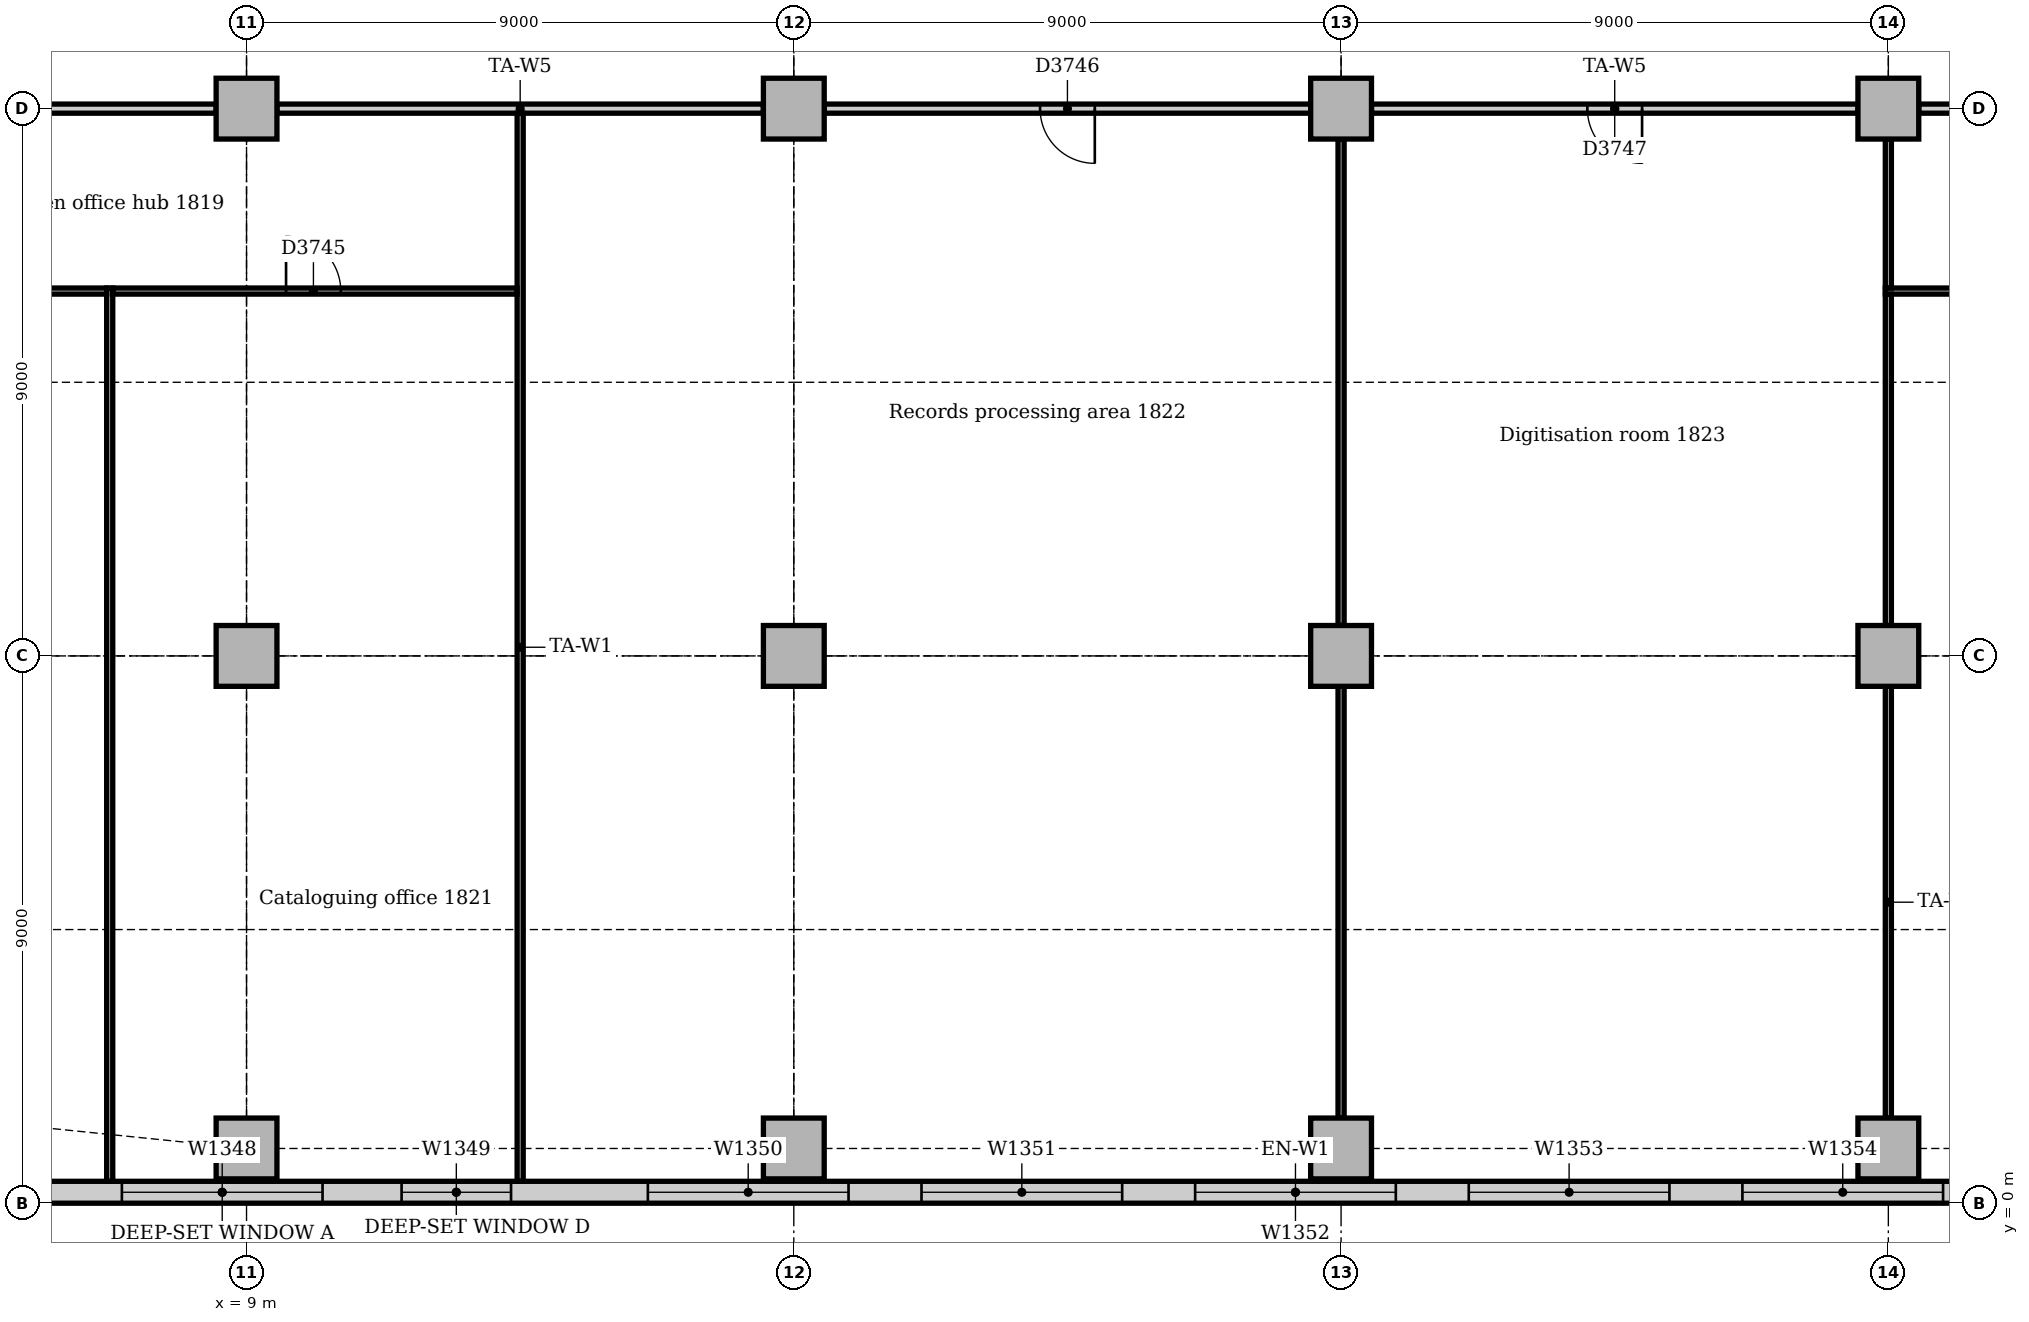
"""IFC4 building model, lengths in metres.
Left out: names, types, materials, properties, quantities, classifications, styles, units other than length and angle.
Written with IfcOpenShell. Run it as: python <this file> out.ifc"""

import sys

from ifc_helpers import new_model, si_unit, direction, frame, frame_2d, origin, origin_2d, place, context, subcontext, project, spatial, rectangle, extrude, element, fill, save


model = new_model("IFC4")
c1 = context("Model", 3, precision=1e-05, world=origin(), true_north=direction((0.0, 1.0)))
c2 = subcontext(c1, "Body", "Model", "MODEL_VIEW")
j1 = project(units=[si_unit("LENGTHUNIT", "METRE"), si_unit("PLANEANGLEUNIT", "RADIAN")], contexts=[c1])
p1 = place(None, origin())
s1 = spatial("IfcSite", under=j1, at=p1, CompositionType="ELEMENT")
p2 = place(p1, origin())
s2 = spatial("IfcBuilding", under=s1, at=p2, CompositionType="ELEMENT")
p3 = place(p2, frame((0.0, 0.0, 79.0)))
s3 = spatial("IfcBuildingStorey", under=s2, at=p3, CompositionType="ELEMENT", Elevation=79.0)
for number, where, z_axis, x_axis in (
    (1, (9.0, 0.9, 0.0), (0.0, 0.0, 1.0), (1.0, 0.0, 0.0)),
    (2, (18.0, 0.9, 0.0), (0.0, 0.0, 1.0), (1.0, 0.0, 0.0)),
    (3, (27.0, 0.9, 0.0), (0.0, 0.0, 1.0), (1.0, 0.0, 0.0)),
    (4, (36.0, 0.9, 0.0), (0.0, 0.0, 1.0), (1.0, 0.0, 0.0)),
    (5, (9.0, 9.0, 0.0), (0.0, 0.0, 1.0), (1.0, 0.0, 0.0)),
    (6, (9.0, 18.0, 0.0), (0.0, 0.0, 1.0), (1.0, 0.0, 0.0)),
    (7, (18.0, 9.0, 0.0), (0.0, 0.0, 1.0), (1.0, 0.0, 0.0)),
    (8, (18.0, 18.0, 0.0), (0.0, 0.0, 1.0), (1.0, 0.0, 0.0)),
    (9, (27.0, 9.0, 0.0), (0.0, 0.0, 1.0), (1.0, 0.0, 0.0)),
    (10, (27.0, 18.0, 0.0), (0.0, 0.0, 1.0), (1.0, 0.0, 0.0)),
    (11, (36.0, 9.0, 0.0), (0.0, 0.0, 1.0), (1.0, 0.0, 0.0)),
    (12, (36.0, 18.0, 0.0), (0.0, 0.0, 1.0), (1.0, 0.0, 0.0)),
):
    element("IfcColumn", number, at=place(p3, frame(where, z_axis=z_axis, x_axis=x_axis)), inside=s3, PredefinedType="COLUMN", context=c2, shape_type="SweptSolid", body=[
        extrude(rectangle(XDim=1.0, YDim=1.0, at=origin_2d()), origin(), (0.0, 0.0, 1.0), 3.85),
    ])
p4 = place(p3, frame((4.243, 0.18, 0.0), z_axis=(0.0, 0.0, 1.0), x_axis=(1.0, 0.0, 0.0)))
e13 = element("IfcWall", 13, at=p4, inside=s3, PredefinedType="STANDARD", context=c2, shape_type="SweptSolid", body=[
    extrude(rectangle(XDim=44.015, YDim=0.36, at=frame_2d((22.007, 0.0))), origin(), (0.0, 0.0, 1.0), 3.85),
])
p5 = place(p4, frame((2.707, 0.0, 0.9)))
e14 = element("IfcOpeningElement", 14, at=p5, cuts=e13, PredefinedType="OPENING", context=c2, shape_type="SweptSolid", body=[
    extrude(rectangle(XDim=3.3, YDim=1.6, at=frame_2d((1.65, 0.8))), frame((0.0, 0.19, 0.0), z_axis=(0.0, -1.0, 0.0), x_axis=(1.0, 0.0, 0.0)), (0.0, 0.0, 1.0), 0.38),
])
p6 = place(p4, frame((7.307, 0.0, 0.9)))
e15 = element("IfcOpeningElement", 15, at=p6, cuts=e13, PredefinedType="OPENING", context=c2, shape_type="SweptSolid", body=[
    extrude(rectangle(XDim=1.8, YDim=1.6, at=frame_2d((0.9, 0.8))), frame((0.0, 0.19, 0.0), z_axis=(0.0, -1.0, 0.0), x_axis=(1.0, 0.0, 0.0)), (0.0, 0.0, 1.0), 0.38),
])
p7 = place(p4, frame((11.357, 0.0, 0.9)))
e16 = element("IfcOpeningElement", 16, at=p7, cuts=e13, PredefinedType="OPENING", context=c2, shape_type="SweptSolid", body=[
    extrude(rectangle(XDim=3.3, YDim=1.6, at=frame_2d((1.65, 0.8))), frame((0.0, 0.19, 0.0), z_axis=(0.0, -1.0, 0.0), x_axis=(1.0, 0.0, 0.0)), (0.0, 0.0, 1.0), 0.38),
])
p8 = place(p4, frame((15.857, 0.0, 0.9)))
e17 = element("IfcOpeningElement", 17, at=p8, cuts=e13, PredefinedType="OPENING", context=c2, shape_type="SweptSolid", body=[
    extrude(rectangle(XDim=3.3, YDim=1.6, at=frame_2d((1.65, 0.8))), frame((0.0, 0.19, 0.0), z_axis=(0.0, -1.0, 0.0), x_axis=(1.0, 0.0, 0.0)), (0.0, 0.0, 1.0), 0.38),
])
p9 = place(p4, frame((20.357, 0.0, 0.9)))
e18 = element("IfcOpeningElement", 18, at=p9, cuts=e13, PredefinedType="OPENING", context=c2, shape_type="SweptSolid", body=[
    extrude(rectangle(XDim=3.3, YDim=1.6, at=frame_2d((1.65, 0.8))), frame((0.0, 0.19, 0.0), z_axis=(0.0, -1.0, 0.0), x_axis=(1.0, 0.0, 0.0)), (0.0, 0.0, 1.0), 0.38),
])
p10 = place(p4, frame((24.857, 0.0, 0.9)))
e19 = element("IfcOpeningElement", 19, at=p10, cuts=e13, PredefinedType="OPENING", context=c2, shape_type="SweptSolid", body=[
    extrude(rectangle(XDim=3.3, YDim=1.6, at=frame_2d((1.65, 0.8))), frame((0.0, 0.19, 0.0), z_axis=(0.0, -1.0, 0.0), x_axis=(1.0, 0.0, 0.0)), (0.0, 0.0, 1.0), 0.38),
])
p11 = place(p4, frame((29.357, 0.0, 0.9)))
e20 = element("IfcOpeningElement", 20, at=p11, cuts=e13, PredefinedType="OPENING", context=c2, shape_type="SweptSolid", body=[
    extrude(rectangle(XDim=3.3, YDim=1.6, at=frame_2d((1.65, 0.8))), frame((0.0, 0.19, 0.0), z_axis=(0.0, -1.0, 0.0), x_axis=(1.0, 0.0, 0.0)), (0.0, 0.0, 1.0), 0.38),
])
p12 = place(p4, frame((33.857, 0.0, 0.9)))
e21 = element("IfcOpeningElement", 21, at=p12, cuts=e13, PredefinedType="OPENING", context=c2, shape_type="SweptSolid", body=[
    extrude(rectangle(XDim=3.3, YDim=1.6, at=frame_2d((1.65, 0.8))), frame((0.0, 0.19, 0.0), z_axis=(0.0, -1.0, 0.0), x_axis=(1.0, 0.0, 0.0)), (0.0, 0.0, 1.0), 0.38),
])
p13 = place(p4, frame((38.357, 0.0, 0.9)))
e22 = element("IfcOpeningElement", 22, at=p13, cuts=e13, PredefinedType="OPENING", context=c2, shape_type="SweptSolid", body=[
    extrude(rectangle(XDim=3.3, YDim=1.6, at=frame_2d((1.65, 0.8))), frame((0.0, 0.19, 0.0), z_axis=(0.0, -1.0, 0.0), x_axis=(1.0, 0.0, 0.0)), (0.0, 0.0, 1.0), 0.38),
])
p14 = place(p3, frame((36.5, 18.0, 0.0), z_axis=(0.0, 0.0, 1.0), x_axis=(1.0, 0.0, 0.0)))
e23 = element("IfcWall", 23, at=p14, inside=s3, PredefinedType="PARTITIONING", context=c2, shape_type="SweptSolid", body=[
    extrude(rectangle(XDim=8.0, YDim=0.15, at=frame_2d((4.0, 0.0))), origin(), (0.0, 0.0, 1.0), 3.15),
])
p15 = place(p3, frame((27.5, 18.0, 0.0), z_axis=(0.0, 0.0, 1.0), x_axis=(1.0, 0.0, 0.0)))
e24 = element("IfcWall", 24, at=p15, inside=s3, PredefinedType="PARTITIONING", context=c2, shape_type="SweptSolid", body=[
    extrude(rectangle(XDim=8.0, YDim=0.15, at=frame_2d((4.0, 0.0))), origin(), (0.0, 0.0, 1.0), 3.15),
])
p16 = place(p15, frame((3.55, 0.0, 0.0)))
e25 = element("IfcOpeningElement", 25, at=p16, cuts=e24, PredefinedType="OPENING", context=c2, shape_type="SweptSolid", body=[
    extrude(rectangle(XDim=0.9, YDim=2.1, at=frame_2d((0.45, 1.05))), frame((0.0, 0.085, 0.0), z_axis=(0.0, -1.0, 0.0), x_axis=(1.0, 0.0, 0.0)), (0.0, 0.0, 1.0), 0.17),
])
p17 = place(p3, frame((18.5, 18.0, 0.0), z_axis=(0.0, 0.0, 1.0), x_axis=(1.0, 0.0, 0.0)))
e26 = element("IfcWall", 26, at=p17, inside=s3, PredefinedType="PARTITIONING", context=c2, shape_type="SweptSolid", body=[
    extrude(rectangle(XDim=8.0, YDim=0.15, at=frame_2d((4.0, 0.0))), origin(), (0.0, 0.0, 1.0), 3.15),
])
p18 = place(p17, frame((3.55, 0.0, 0.0)))
e27 = element("IfcOpeningElement", 27, at=p18, cuts=e26, PredefinedType="OPENING", context=c2, shape_type="SweptSolid", body=[
    extrude(rectangle(XDim=0.9, YDim=2.1, at=frame_2d((0.45, 1.05))), frame((0.0, 0.085, 0.0), z_axis=(0.0, -1.0, 0.0), x_axis=(1.0, 0.0, 0.0)), (0.0, 0.0, 1.0), 0.17),
])
p19 = place(p3, frame((9.5, 18.0, 0.0), z_axis=(0.0, 0.0, 1.0), x_axis=(1.0, 0.0, 0.0)))
e28 = element("IfcWall", 28, at=p19, inside=s3, PredefinedType="PARTITIONING", context=c2, shape_type="SweptSolid", body=[
    extrude(rectangle(XDim=8.0, YDim=0.15, at=frame_2d((4.0, 0.0))), origin(), (0.0, 0.0, 1.0), 3.15),
])
p20 = place(p3, frame((1.4, 18.0, 0.0), z_axis=(0.0, 0.0, 1.0), x_axis=(1.0, 0.0, 0.0)))
e29 = element("IfcWall", 29, at=p20, inside=s3, PredefinedType="PARTITIONING", context=c2, shape_type="SweptSolid", body=[
    extrude(rectangle(XDim=7.1, YDim=0.15, at=frame_2d((3.55, 0.0))), origin(), (0.0, 0.0, 1.0), 3.15),
])
p21 = place(p20, frame((3.05, 0.0, 0.0)))
e30 = element("IfcOpeningElement", 30, at=p21, cuts=e29, PredefinedType="OPENING", context=c2, shape_type="SweptSolid", body=[
    extrude(rectangle(XDim=1.0, YDim=2.1, at=frame_2d((0.5, 1.05))), frame((0.0, 0.085, 0.0), z_axis=(0.0, -1.0, 0.0), x_axis=(1.0, 0.0, 0.0)), (0.0, 0.0, 1.0), 0.17),
])
p22 = place(p3, frame((35.95, 15.0, 0.0), z_axis=(0.0, 0.0, 1.0), x_axis=(1.0, 0.0, 0.0)))
e31 = element("IfcWall", 31, at=p22, inside=s3, PredefinedType="PARTITIONING", context=c2, shape_type="SweptSolid", body=[
    extrude(rectangle(XDim=17.975, YDim=0.1, at=frame_2d((8.988, 0.0))), origin(), (0.0, 0.0, 1.0), 3.85),
])
p23 = place(p22, frame((8.55, 0.0, 0.0)))
e32 = element("IfcOpeningElement", 32, at=p23, cuts=e31, PredefinedType="OPENING", context=c2, shape_type="SweptSolid", body=[
    extrude(rectangle(XDim=0.9, YDim=2.1, at=frame_2d((0.45, 1.05))), frame((0.0, 0.06, 0.0), z_axis=(0.0, -1.0, 0.0), x_axis=(1.0, 0.0, 0.0)), (0.0, 0.0, 1.0), 0.12),
])
p24 = place(p3, frame((13.5, 0.36, 0.0), z_axis=(0.0, 0.0, 1.0), x_axis=(0.0, 1.0, 0.0)))
e33 = element("IfcWall", 33, at=p24, inside=s3, PredefinedType="PARTITIONING", context=c2, shape_type="SweptSolid", body=[
    extrude(rectangle(XDim=17.565, YDim=0.1, at=frame_2d((8.783, 0.0))), origin(), (0.0, 0.0, 1.0), 3.85),
])
p25 = place(p3, frame((27.0, 1.4, 0.0), z_axis=(0.0, 0.0, 1.0), x_axis=(0.0, 1.0, 0.0)))
e34 = element("IfcWall", 34, at=p25, inside=s3, PredefinedType="PARTITIONING", context=c2, shape_type="SweptSolid", body=[
    extrude(rectangle(XDim=7.1, YDim=0.1, at=frame_2d((3.55, 0.0))), origin(), (0.0, 0.0, 1.0), 3.158),
])
p26 = place(p3, frame((27.0, 9.5, 0.0), z_axis=(0.0, 0.0, 1.0), x_axis=(0.0, 1.0, 0.0)))
e35 = element("IfcWall", 35, at=p26, inside=s3, PredefinedType="PARTITIONING", context=c2, shape_type="SweptSolid", body=[
    extrude(rectangle(XDim=8.0, YDim=0.1, at=frame_2d((4.0, 0.0))), origin(), (0.0, 0.0, 1.0), 3.158),
])
p27 = place(p3, frame((36.0, 1.4, 0.0), z_axis=(0.0, 0.0, 1.0), x_axis=(0.0, 1.0, 0.0)))
e36 = element("IfcWall", 36, at=p27, inside=s3, PredefinedType="PARTITIONING", context=c2, shape_type="SweptSolid", body=[
    extrude(rectangle(XDim=7.1, YDim=0.1, at=frame_2d((3.55, 0.0))), origin(), (0.0, 0.0, 1.0), 3.158),
])
p28 = place(p3, frame((36.0, 15.05, 0.0), z_axis=(0.0, 0.0, 1.0), x_axis=(0.0, 1.0, 0.0)))
e37 = element("IfcWall", 37, at=p28, inside=s3, PredefinedType="PARTITIONING", context=c2, shape_type="SweptSolid", body=[
    extrude(rectangle(XDim=2.45, YDim=0.1, at=frame_2d((1.225, 0.0))), origin(), (0.0, 0.0, 1.0), 3.158),
])
p29 = place(p3, frame((36.0, 9.5, 0.0), z_axis=(0.0, 0.0, 1.0), x_axis=(0.0, 1.0, 0.0)))
e38 = element("IfcWall", 38, at=p29, inside=s3, PredefinedType="PARTITIONING", context=c2, shape_type="SweptSolid", body=[
    extrude(rectangle(XDim=5.45, YDim=0.1, at=frame_2d((2.725, 0.0))), origin(), (0.0, 0.0, 1.0), 3.158),
])
p30 = place(p3, frame((6.75, 0.36, 0.0), z_axis=(0.0, 0.0, 1.0), x_axis=(0.0, 1.0, 0.0)))
e39 = element("IfcWall", 39, at=p30, inside=s3, PredefinedType="PARTITIONING", context=c2, shape_type="SweptSolid", body=[
    extrude(rectangle(XDim=14.69, YDim=0.1, at=frame_2d((7.345, 0.0))), origin(), (0.0, 0.0, 1.0), 3.85),
])
p31 = place(p3, frame((6.8, 15.0, 0.0), z_axis=(0.0, 0.0, 1.0), x_axis=(1.0, 0.0, 0.0)))
e40 = element("IfcWall", 40, at=p31, inside=s3, PredefinedType="PARTITIONING", context=c2, shape_type="SweptSolid", body=[
    extrude(rectangle(XDim=6.65, YDim=0.1, at=frame_2d((3.325, 0.0))), origin(), (0.0, 0.0, 1.0), 3.85),
])
p32 = place(p31, frame((2.85, 0.0, 0.0)))
e41 = element("IfcOpeningElement", 41, at=p32, cuts=e40, PredefinedType="OPENING", context=c2, shape_type="SweptSolid", body=[
    extrude(rectangle(XDim=0.9, YDim=2.1, at=frame_2d((0.45, 1.05))), frame((0.0, 0.06, 0.0), z_axis=(0.0, -1.0, 0.0), x_axis=(1.0, 0.0, 0.0)), (0.0, 0.0, 1.0), 0.12),
])
p33 = place(p3, frame((0.36, 15.0, 0.0), z_axis=(0.0, 0.0, 1.0), x_axis=(1.0, 0.0, 0.0)))
e42 = element("IfcWall", 42, at=p33, inside=s3, PredefinedType="PARTITIONING", context=c2, shape_type="SweptSolid", body=[
    extrude(rectangle(XDim=6.34, YDim=0.1, at=frame_2d((3.17, 0.0))), origin(), (0.0, 0.0, 1.0), 3.85),
])
p34 = place(p33, frame((2.7, 0.0, 0.0)))
e43 = element("IfcOpeningElement", 43, at=p34, cuts=e42, PredefinedType="OPENING", context=c2, shape_type="SweptSolid", body=[
    extrude(rectangle(XDim=0.9, YDim=2.1, at=frame_2d((0.45, 1.05))), frame((0.0, 0.06, 0.0), z_axis=(0.0, -1.0, 0.0), x_axis=(1.0, 0.0, 0.0)), (0.0, 0.0, 1.0), 0.12),
])
p35 = place(p5, origin())
e44 = element("IfcWindow", 44, at=p35, inside=s3, PartitioningType="SINGLE_PANEL", PredefinedType="WINDOW", context=c2, shape_type="SweptSolid", body=[
    extrude(rectangle(XDim=3.3, YDim=1.6, at=frame_2d((1.65, 0.8))), frame((0.0, 0.13, 0.0), z_axis=(0.0, -1.0, 0.0), x_axis=(1.0, 0.0, 0.0)), (0.0, 0.0, 1.0), 0.06),
])
fill(e14, e44)
p36 = place(p6, origin())
e45 = element("IfcWindow", 45, at=p36, inside=s3, PartitioningType="SINGLE_PANEL", PredefinedType="WINDOW", context=c2, shape_type="SweptSolid", body=[
    extrude(rectangle(XDim=1.8, YDim=1.6, at=frame_2d((0.9, 0.8))), frame((0.0, 0.13, 0.0), z_axis=(0.0, -1.0, 0.0), x_axis=(1.0, 0.0, 0.0)), (0.0, 0.0, 1.0), 0.06),
])
fill(e15, e45)
p37 = place(p7, origin())
e46 = element("IfcWindow", 46, at=p37, inside=s3, PartitioningType="SINGLE_PANEL", PredefinedType="WINDOW", context=c2, shape_type="SweptSolid", body=[
    extrude(rectangle(XDim=3.3, YDim=1.6, at=frame_2d((1.65, 0.8))), frame((0.0, 0.13, 0.0), z_axis=(0.0, -1.0, 0.0), x_axis=(1.0, 0.0, 0.0)), (0.0, 0.0, 1.0), 0.06),
])
fill(e16, e46)
p38 = place(p8, origin())
e47 = element("IfcWindow", 47, at=p38, inside=s3, PartitioningType="SINGLE_PANEL", PredefinedType="WINDOW", context=c2, shape_type="SweptSolid", body=[
    extrude(rectangle(XDim=3.3, YDim=1.6, at=frame_2d((1.65, 0.8))), frame((0.0, 0.13, 0.0), z_axis=(0.0, -1.0, 0.0), x_axis=(1.0, 0.0, 0.0)), (0.0, 0.0, 1.0), 0.06),
])
fill(e17, e47)
p39 = place(p9, origin())
e48 = element("IfcWindow", 48, at=p39, inside=s3, PartitioningType="SINGLE_PANEL", PredefinedType="WINDOW", context=c2, shape_type="SweptSolid", body=[
    extrude(rectangle(XDim=3.3, YDim=1.6, at=frame_2d((1.65, 0.8))), frame((0.0, 0.13, 0.0), z_axis=(0.0, -1.0, 0.0), x_axis=(1.0, 0.0, 0.0)), (0.0, 0.0, 1.0), 0.06),
])
fill(e18, e48)
p40 = place(p10, origin())
e49 = element("IfcWindow", 49, at=p40, inside=s3, PartitioningType="SINGLE_PANEL", PredefinedType="WINDOW", context=c2, shape_type="SweptSolid", body=[
    extrude(rectangle(XDim=3.3, YDim=1.6, at=frame_2d((1.65, 0.8))), frame((0.0, 0.13, 0.0), z_axis=(0.0, -1.0, 0.0), x_axis=(1.0, 0.0, 0.0)), (0.0, 0.0, 1.0), 0.06),
])
fill(e19, e49)
p41 = place(p11, origin())
e50 = element("IfcWindow", 50, at=p41, inside=s3, PartitioningType="SINGLE_PANEL", PredefinedType="WINDOW", context=c2, shape_type="SweptSolid", body=[
    extrude(rectangle(XDim=3.3, YDim=1.6, at=frame_2d((1.65, 0.8))), frame((0.0, 0.13, 0.0), z_axis=(0.0, -1.0, 0.0), x_axis=(1.0, 0.0, 0.0)), (0.0, 0.0, 1.0), 0.06),
])
fill(e20, e50)
p42 = place(p32, origin())
e51 = element("IfcDoor", 51, at=p42, inside=s3, OperationType="SINGLE_SWING_LEFT", PredefinedType="DOOR", context=c2, shape_type="SweptSolid", body=[
    extrude(rectangle(XDim=0.9, YDim=2.1, at=frame_2d((0.45, 1.05))), frame((0.0, 0.025, 0.0), z_axis=(0.0, -1.0, 0.0), x_axis=(1.0, 0.0, 0.0)), (0.0, 0.0, 1.0), 0.05),
])
fill(e41, e51)
p43 = place(p18, frame((0.9, 0.0, 0.0), z_axis=(0.0, 0.0, 1.0), x_axis=(-1.0, 0.0, 0.0)))
e52 = element("IfcDoor", 52, at=p43, inside=s3, OperationType="SINGLE_SWING_LEFT", PredefinedType="DOOR", context=c2, shape_type="SweptSolid", body=[
    extrude(rectangle(XDim=0.9, YDim=2.1, at=frame_2d((0.45, 1.05))), frame((0.0, 0.025, 0.0), z_axis=(0.0, -1.0, 0.0), x_axis=(1.0, 0.0, 0.0)), (0.0, 0.0, 1.0), 0.05),
])
fill(e27, e52)
p44 = place(p16, frame((0.9, 0.0, 0.0), z_axis=(0.0, 0.0, 1.0), x_axis=(-1.0, 0.0, 0.0)))
e53 = element("IfcDoor", 53, at=p44, inside=s3, OperationType="SINGLE_SWING_LEFT", PredefinedType="DOOR", context=c2, shape_type="SweptSolid", body=[
    extrude(rectangle(XDim=0.9, YDim=2.1, at=frame_2d((0.45, 1.05))), frame((0.0, 0.025, 0.0), z_axis=(0.0, -1.0, 0.0), x_axis=(1.0, 0.0, 0.0)), (0.0, 0.0, 1.0), 0.05),
])
fill(e25, e53)
save(model, sys.argv[1])
